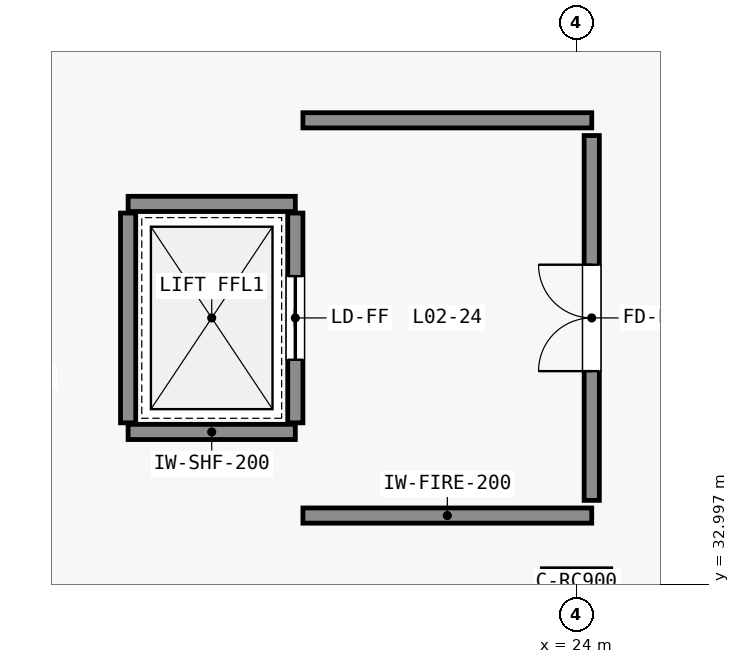
"""IFC4 building model, lengths in metres.
Left out: names, types, materials, properties, quantities, classifications, styles, units other than length and angle.
Written with IfcOpenShell. Run it as: python <this file> out.ifc"""

import sys

from ifc_helpers import new_model, si_unit, direction, frame, frame_2d, origin, origin_2d, place, context, subcontext, project, spatial, rectangle, extrude, element, fill, save


model = new_model("IFC4")
c1 = context("Model", 3, precision=1e-05, world=origin(), true_north=direction((0.0, 1.0)))
c2 = subcontext(c1, "Body", "Model", "MODEL_VIEW")
j1 = project(units=[si_unit("LENGTHUNIT", "METRE"), si_unit("PLANEANGLEUNIT", "RADIAN")], contexts=[c1])
p1 = place(None, origin())
s1 = spatial("IfcSite", under=j1, at=p1, CompositionType="ELEMENT")
p2 = place(p1, origin())
s2 = spatial("IfcBuilding", under=s1, at=p2, CompositionType="ELEMENT")
p3 = place(p2, frame((0.0, 0.0, 11.4)))
s3 = spatial("IfcBuildingStorey", under=s2, at=p3, CompositionType="ELEMENT", Elevation=11.4)
p4 = place(p3, frame((24.0, 32.6, 0.0), z_axis=(0.0, 0.0, 1.0), x_axis=(1.0, 0.0, 0.0)))
e1 = element("IfcColumn", 1, at=p4, inside=s3, PredefinedType="COLUMN", context=c2, shape_type="SweptSolid", body=[
    extrude(rectangle(XDim=0.9, YDim=1.2, at=origin_2d()), origin(), (0.0, 0.0, 1.0), 4.8),
])
for number, where, z_axis, x_axis in (
    (2, (18.1, 35.0, 0.0), (0.0, 0.0, 1.0), (1.0, 0.0, 0.0)),
    (3, (18.1, 38.0, 0.0), (0.0, 0.0, 1.0), (1.0, 0.0, 0.0)),
):
    element("IfcWall", number, at=place(p3, frame(where, z_axis=z_axis, x_axis=x_axis)), inside=s3, PredefinedType="STANDARD", context=c2, shape_type="SweptSolid", body=[
        extrude(rectangle(XDim=2.2, YDim=0.2, at=frame_2d((1.1, 0.0))), origin(), (0.0, 0.0, 1.0), 4.45),
    ])
p5 = place(p3, frame((18.1, 35.12, 0.0), z_axis=(0.0, 0.0, 1.0), x_axis=(0.0, 1.0, 0.0)))
e4 = element("IfcWall", 4, at=p5, inside=s3, PredefinedType="STANDARD", context=c2, shape_type="SweptSolid", body=[
    extrude(rectangle(XDim=2.76, YDim=0.2, at=frame_2d((1.38, 0.0))), origin(), (0.0, 0.0, 1.0), 4.45),
])
p6 = place(p3, frame((20.3, 35.12, 0.0), z_axis=(0.0, 0.0, 1.0), x_axis=(0.0, 1.0, 0.0)))
e5 = element("IfcWall", 5, at=p6, inside=s3, PredefinedType="STANDARD", context=c2, shape_type="SweptSolid", body=[
    extrude(rectangle(XDim=2.76, YDim=0.2, at=frame_2d((1.38, 0.0))), origin(), (0.0, 0.0, 1.0), 4.45),
])
p7 = place(p6, frame((0.83, 0.0, 0.0)))
e6 = element("IfcOpeningElement", 6, at=p7, cuts=e5, PredefinedType="OPENING", context=c2, shape_type="SweptSolid", body=[
    extrude(rectangle(XDim=1.1, YDim=2.15, at=frame_2d((0.55, 1.075))), frame((0.0, 0.11, 0.0), z_axis=(0.0, -1.0, 0.0), x_axis=(1.0, 0.0, 0.0)), (0.0, 0.0, 1.0), 0.22),
])
for number, where, z_axis, x_axis in (
    (7, (20.4, 33.9, 0.0), (0.0, 0.0, 1.0), (1.0, 0.0, 0.0)),
    (8, (20.4, 39.1, 0.0), (0.0, 0.0, 1.0), (1.0, 0.0, 0.0)),
):
    element("IfcWall", number, at=place(p3, frame(where, z_axis=z_axis, x_axis=x_axis)), inside=s3, PredefinedType="STANDARD", context=c2, shape_type="SweptSolid", body=[
        extrude(rectangle(XDim=3.8, YDim=0.2, at=frame_2d((1.9, 0.0))), origin(), (0.0, 0.0, 1.0), 3.6),
    ])
p8 = place(p3, frame((24.2, 34.1, 0.0), z_axis=(0.0, 0.0, 1.0), x_axis=(0.0, 1.0, 0.0)))
e9 = element("IfcWall", 9, at=p8, inside=s3, PredefinedType="STANDARD", context=c2, shape_type="SweptSolid", body=[
    extrude(rectangle(XDim=4.8, YDim=0.2, at=frame_2d((2.4, 0.0))), origin(), (0.0, 0.0, 1.0), 3.6),
])
p9 = place(p8, frame((1.7, 0.0, 0.0)))
e10 = element("IfcOpeningElement", 10, at=p9, cuts=e9, PredefinedType="OPENING", context=c2, shape_type="SweptSolid", body=[
    extrude(rectangle(XDim=1.4, YDim=2.2, at=frame_2d((0.7, 1.1))), frame((0.0, 0.11, 0.0), z_axis=(0.0, -1.0, 0.0), x_axis=(1.0, 0.0, 0.0)), (0.0, 0.0, 1.0), 0.22),
])
p10 = place(p7, origin())
e11 = element("IfcDoor", 11, at=p10, inside=s3, OperationType="SLIDING_TO_LEFT", PredefinedType="DOOR", context=c2, shape_type="SweptSolid", body=[
    extrude(rectangle(XDim=1.1, YDim=2.15, at=frame_2d((0.55, 1.075))), frame((0.0, 0.025, 0.0), z_axis=(0.0, -1.0, 0.0), x_axis=(1.0, 0.0, 0.0)), (0.0, 0.0, 1.0), 0.05),
])
fill(e6, e11)
p11 = place(p9, origin())
e12 = element("IfcDoor", 12, at=p11, inside=s3, OperationType="DOUBLE_DOOR_SINGLE_SWING", PredefinedType="DOOR", context=c2, shape_type="SweptSolid", body=[
    extrude(rectangle(XDim=1.4, YDim=2.2, at=frame_2d((0.7, 1.1))), frame((0.0, 0.025, 0.0), z_axis=(0.0, -1.0, 0.0), x_axis=(1.0, 0.0, 0.0)), (0.0, 0.0, 1.0), 0.05),
])
fill(e10, e12)
save(model, sys.argv[1])
